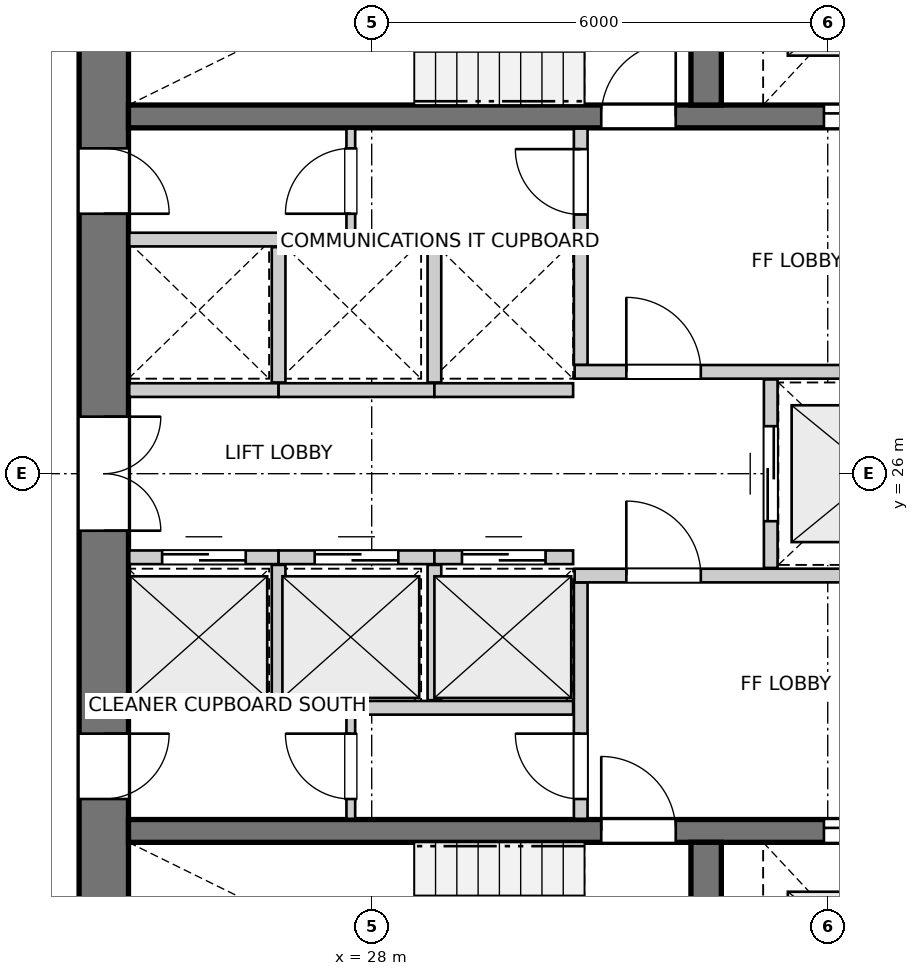
"""IFC4 building model, lengths in metres.
Left out: names, types, materials, properties, quantities, classifications, styles, units other than length and angle.
Written with IfcOpenShell. Run it as: python <this file> out.ifc"""

import sys

from ifc_helpers import new_model, si_unit, direction, frame, frame_2d, origin, place, context, subcontext, project, spatial, rectangle, extrude, source, transform, mapped, element, fill, save


model = new_model("IFC4")
c1 = context("Model", 3, precision=1e-05, world=origin(), true_north=direction((0.0, 1.0)))
c2 = subcontext(c1, "Body", "Model", "MODEL_VIEW")
j1 = project(units=[si_unit("LENGTHUNIT", "METRE"), si_unit("PLANEANGLEUNIT", "RADIAN")], contexts=[c1])
p1 = place(None, origin())
s1 = spatial("IfcSite", under=j1, at=p1, CompositionType="ELEMENT")
p2 = place(p1, origin())
s2 = spatial("IfcBuilding", under=s1, at=p2, CompositionType="ELEMENT")
p3 = place(p2, frame((0.0, 0.0, 80.0)))
s3 = spatial("IfcBuildingStorey", under=s2, at=p3, CompositionType="ELEMENT", Elevation=80.0)
p4 = place(p3, frame((24.475, 33.8, 0.0), z_axis=(0.0, 0.0, 1.0), x_axis=(0.0, -1.0, 0.0)))
e1 = element("IfcWall", 1, at=p4, inside=s3, PredefinedType="SHEAR", context=c2, shape_type="SweptSolid", body=[
    extrude(rectangle(XDim=15.6, YDim=0.65, at=frame_2d((7.8, 0.0))), origin(), (0.0, 0.0, 1.0), 2.935),
])
p5 = place(p4, frame((7.05, 0.0, 0.0)))
e2 = element("IfcOpeningElement", 2, at=p5, cuts=e1, PredefinedType="OPENING", context=c2, shape_type="SweptSolid", body=[
    extrude(rectangle(XDim=1.5, YDim=2.15, at=frame_2d((0.75, 1.075))), frame((0.0, 0.335, 0.0), z_axis=(0.0, -1.0, 0.0), x_axis=(1.0, 0.0, 0.0)), (0.0, 0.0, 1.0), 0.67),
])
p6 = place(p4, frame((3.52, 0.0, 0.0)))
e3 = element("IfcOpeningElement", 3, at=p6, cuts=e1, PredefinedType="OPENING", context=c2, shape_type="SweptSolid", body=[
    extrude(rectangle(XDim=0.86, YDim=2.05, at=frame_2d((0.43, 1.025))), frame((0.0, 0.335, 0.0), z_axis=(0.0, -1.0, 0.0), x_axis=(1.0, 0.0, 0.0)), (0.0, 0.0, 1.0), 0.67),
])
p7 = place(p4, frame((11.22, 0.0, 0.0)))
e4 = element("IfcOpeningElement", 4, at=p7, cuts=e1, PredefinedType="OPENING", context=c2, shape_type="SweptSolid", body=[
    extrude(rectangle(XDim=0.86, YDim=2.05, at=frame_2d((0.43, 1.025))), frame((0.0, 0.335, 0.0), z_axis=(0.0, -1.0, 0.0), x_axis=(1.0, 0.0, 0.0)), (0.0, 0.0, 1.0), 0.67),
])
p8 = place(p3, frame((24.8, 21.3, 0.0), z_axis=(0.0, 0.0, 1.0), x_axis=(1.0, 0.0, 0.0)))
e5 = element("IfcWall", 5, at=p8, inside=s3, PredefinedType="SHEAR", context=c2, shape_type="SweptSolid", body=[
    extrude(rectangle(XDim=11.1, YDim=0.3, at=frame_2d((5.55, 0.0))), origin(), (0.0, 0.0, 1.0), 2.935),
])
p9 = place(p8, frame((6.22, 0.0, 0.0)))
e6 = element("IfcOpeningElement", 6, at=p9, cuts=e5, PredefinedType="OPENING", context=c2, shape_type="SweptSolid", body=[
    extrude(rectangle(XDim=0.98, YDim=2.15, at=frame_2d((0.49, 1.075))), frame((0.0, 0.16, 0.0), z_axis=(0.0, -1.0, 0.0), x_axis=(1.0, 0.0, 0.0)), (0.0, 0.0, 1.0), 0.32),
])
p10 = place(p8, frame((9.15, 0.0, 0.0)))
e7 = element("IfcOpeningElement", 7, at=p10, cuts=e5, PredefinedType="OPENING", context=c2, shape_type="SweptSolid", body=[
    extrude(rectangle(XDim=1.15, YDim=2.15, at=frame_2d((0.575, 1.075))), frame((0.0, 0.16, 0.0), z_axis=(0.0, -1.0, 0.0), x_axis=(1.0, 0.0, 0.0)), (0.0, 0.0, 1.0), 0.32),
])
p11 = place(p3, frame((32.4, 18.2, 0.0), z_axis=(0.0, 0.0, 1.0), x_axis=(0.0, 1.0, 0.0)))
e8 = element("IfcWall", 8, at=p11, inside=s3, PredefinedType="SHEAR", context=c2, shape_type="SweptSolid", body=[
    extrude(rectangle(XDim=2.95, YDim=0.4, at=frame_2d((1.475, 0.0))), origin(), (0.0, 0.0, 1.0), 2.935),
])
p12 = place(p3, frame((24.8, 30.7, 0.0), z_axis=(0.0, 0.0, 1.0), x_axis=(1.0, 0.0, 0.0)))
e9 = element("IfcWall", 9, at=p12, inside=s3, PredefinedType="SHEAR", context=c2, shape_type="SweptSolid", body=[
    extrude(rectangle(XDim=11.1, YDim=0.3, at=frame_2d((5.55, 0.0))), origin(), (0.0, 0.0, 1.0), 2.935),
])
p13 = place(p12, frame((6.22, 0.0, 0.0)))
e10 = element("IfcOpeningElement", 10, at=p13, cuts=e9, PredefinedType="OPENING", context=c2, shape_type="SweptSolid", body=[
    extrude(rectangle(XDim=0.98, YDim=2.15, at=frame_2d((0.49, 1.075))), frame((0.0, 0.16, 0.0), z_axis=(0.0, -1.0, 0.0), x_axis=(1.0, 0.0, 0.0)), (0.0, 0.0, 1.0), 0.32),
])
p14 = place(p12, frame((9.15, 0.0, 0.0)))
e11 = element("IfcOpeningElement", 11, at=p14, cuts=e9, PredefinedType="OPENING", context=c2, shape_type="SweptSolid", body=[
    extrude(rectangle(XDim=1.15, YDim=2.15, at=frame_2d((0.575, 1.075))), frame((0.0, 0.16, 0.0), z_axis=(0.0, -1.0, 0.0), x_axis=(1.0, 0.0, 0.0)), (0.0, 0.0, 1.0), 0.32),
])
p15 = place(p3, frame((32.4, 30.85, 0.0), z_axis=(0.0, 0.0, 1.0), x_axis=(0.0, 1.0, 0.0)))
e12 = element("IfcWall", 12, at=p15, inside=s3, PredefinedType="SHEAR", context=c2, shape_type="SweptSolid", body=[
    extrude(rectangle(XDim=2.95, YDim=0.4, at=frame_2d((1.475, 0.0))), origin(), (0.0, 0.0, 1.0), 2.935),
])
p16 = place(p3, frame((30.75, 21.46, 0.0), z_axis=(0.0, 0.0, 1.0), x_axis=(0.0, 1.0, 0.0)))
e13 = element("IfcWall", 13, at=p16, inside=s3, PredefinedType="PARTITIONING", context=c2, shape_type="SweptSolid", body=[
    extrude(rectangle(XDim=3.11, YDim=0.18, at=frame_2d((1.555, 0.0))), origin(), (0.0, 0.0, 1.0), 2.935),
])
p17 = place(p16, frame((0.26, 0.0, 0.0)))
e14 = element("IfcOpeningElement", 14, at=p17, cuts=e13, PredefinedType="OPENING", context=c2, shape_type="SweptSolid", body=[
    extrude(rectangle(XDim=0.86, YDim=2.05, at=frame_2d((0.43, 1.025))), frame((0.0, 0.1, 0.0), z_axis=(0.0, -1.0, 0.0), x_axis=(1.0, 0.0, 0.0)), (0.0, 0.0, 1.0), 0.2),
])
p18 = place(p3, frame((30.67, 24.66, 0.0), z_axis=(0.0, 0.0, 1.0), x_axis=(1.0, 0.0, 0.0)))
e15 = element("IfcWall", 15, at=p18, inside=s3, PredefinedType="PARTITIONING", context=c2, shape_type="SweptSolid", body=[
    extrude(rectangle(XDim=5.22, YDim=0.18, at=frame_2d((2.61, 0.0))), origin(), (0.0, 0.0, 1.0), 2.935),
])
p19 = place(p18, frame((0.68, 0.0, 0.0)))
e16 = element("IfcOpeningElement", 16, at=p19, cuts=e15, PredefinedType="OPENING", context=c2, shape_type="SweptSolid", body=[
    extrude(rectangle(XDim=0.98, YDim=2.15, at=frame_2d((0.49, 1.075))), frame((0.0, 0.1, 0.0), z_axis=(0.0, -1.0, 0.0), x_axis=(1.0, 0.0, 0.0)), (0.0, 0.0, 1.0), 0.2),
])
p20 = place(p3, frame((30.75, 27.43, 0.0), z_axis=(0.0, 0.0, 1.0), x_axis=(0.0, 1.0, 0.0)))
e17 = element("IfcWall", 17, at=p20, inside=s3, PredefinedType="PARTITIONING", context=c2, shape_type="SweptSolid", body=[
    extrude(rectangle(XDim=3.11, YDim=0.18, at=frame_2d((1.555, 0.0))), origin(), (0.0, 0.0, 1.0), 2.935),
])
p21 = place(p20, frame((1.98, 0.0, 0.0)))
e18 = element("IfcOpeningElement", 18, at=p21, cuts=e17, PredefinedType="OPENING", context=c2, shape_type="SweptSolid", body=[
    extrude(rectangle(XDim=0.86, YDim=2.05, at=frame_2d((0.43, 1.025))), frame((0.0, 0.1, 0.0), z_axis=(0.0, -1.0, 0.0), x_axis=(1.0, 0.0, 0.0)), (0.0, 0.0, 1.0), 0.2),
])
p22 = place(p3, frame((30.67, 27.34, 0.0), z_axis=(0.0, 0.0, 1.0), x_axis=(1.0, 0.0, 0.0)))
e19 = element("IfcWall", 19, at=p22, inside=s3, PredefinedType="PARTITIONING", context=c2, shape_type="SweptSolid", body=[
    extrude(rectangle(XDim=5.22, YDim=0.18, at=frame_2d((2.61, 0.0))), origin(), (0.0, 0.0, 1.0), 2.935),
])
p23 = place(p22, frame((0.68, 0.0, 0.0)))
e20 = element("IfcOpeningElement", 20, at=p23, cuts=e19, PredefinedType="OPENING", context=c2, shape_type="SweptSolid", body=[
    extrude(rectangle(XDim=0.98, YDim=2.15, at=frame_2d((0.49, 1.075))), frame((0.0, 0.1, 0.0), z_axis=(0.0, -1.0, 0.0), x_axis=(1.0, 0.0, 0.0)), (0.0, 0.0, 1.0), 0.2),
])
p24 = place(p3, frame((33.25, 24.76, 0.0), z_axis=(0.0, 0.0, 1.0), x_axis=(0.0, 1.0, 0.0)))
e21 = element("IfcWall", 21, at=p24, inside=s3, PredefinedType="PARTITIONING", context=c2, shape_type="SweptSolid", body=[
    extrude(rectangle(XDim=2.48, YDim=0.18, at=frame_2d((1.24, 0.0))), origin(), (0.0, 0.0, 1.0), 2.935),
])
p25 = place(p24, frame((0.615, 0.0, 0.0)))
e22 = element("IfcOpeningElement", 22, at=p25, cuts=e21, PredefinedType="OPENING", context=c2, shape_type="SweptSolid", body=[
    extrude(rectangle(XDim=1.25, YDim=2.15, at=frame_2d((0.625, 1.075))), frame((0.0, 0.1, 0.0), z_axis=(0.0, -1.0, 0.0), x_axis=(1.0, 0.0, 0.0)), (0.0, 0.0, 1.0), 0.2),
])
p26 = place(p3, frame((24.81, 22.92, 0.0), z_axis=(0.0, 0.0, 1.0), x_axis=(1.0, 0.0, 0.0)))
e23 = element("IfcWall", 23, at=p26, inside=s3, PredefinedType="PARTITIONING", context=c2, shape_type="SweptSolid", body=[
    extrude(rectangle(XDim=5.84, YDim=0.18, at=frame_2d((2.92, 0.0))), origin(), (0.0, 0.0, 1.0), 2.935),
])
p27 = place(p3, frame((24.81, 24.9, 0.0), z_axis=(0.0, 0.0, 1.0), x_axis=(1.0, 0.0, 0.0)))
e24 = element("IfcWall", 24, at=p27, inside=s3, PredefinedType="PARTITIONING", context=c2, shape_type="SweptSolid", body=[
    extrude(rectangle(XDim=1.965, YDim=0.18, at=frame_2d((0.982, 0.0))), origin(), (0.0, 0.0, 1.0), 2.935),
])
p28 = place(p27, frame((0.433, 0.0, 0.0)))
e25 = element("IfcOpeningElement", 25, at=p28, cuts=e24, PredefinedType="OPENING", context=c2, shape_type="SweptSolid", body=[
    extrude(rectangle(XDim=1.1, YDim=2.15, at=frame_2d((0.55, 1.075))), frame((0.0, 0.1, 0.0), z_axis=(0.0, -1.0, 0.0), x_axis=(1.0, 0.0, 0.0)), (0.0, 0.0, 1.0), 0.2),
])
p29 = place(p3, frame((26.775, 24.9, 0.0), z_axis=(0.0, 0.0, 1.0), x_axis=(1.0, 0.0, 0.0)))
e26 = element("IfcWall", 26, at=p29, inside=s3, PredefinedType="PARTITIONING", context=c2, shape_type="SweptSolid", body=[
    extrude(rectangle(XDim=2.05, YDim=0.18, at=frame_2d((1.025, 0.0))), origin(), (0.0, 0.0, 1.0), 2.935),
])
p30 = place(p29, frame((0.475, 0.0, 0.0)))
e27 = element("IfcOpeningElement", 27, at=p30, cuts=e26, PredefinedType="OPENING", context=c2, shape_type="SweptSolid", body=[
    extrude(rectangle(XDim=1.1, YDim=2.15, at=frame_2d((0.55, 1.075))), frame((0.0, 0.1, 0.0), z_axis=(0.0, -1.0, 0.0), x_axis=(1.0, 0.0, 0.0)), (0.0, 0.0, 1.0), 0.2),
])
p31 = place(p3, frame((26.775, 23.02, 0.0), z_axis=(0.0, 0.0, 1.0), x_axis=(0.0, 1.0, 0.0)))
e28 = element("IfcWall", 28, at=p31, inside=s3, PredefinedType="PARTITIONING", context=c2, shape_type="SweptSolid", body=[
    extrude(rectangle(XDim=1.78, YDim=0.18, at=frame_2d((0.89, 0.0))), origin(), (0.0, 0.0, 1.0), 2.935),
])
p32 = place(p3, frame((28.825, 24.9, 0.0), z_axis=(0.0, 0.0, 1.0), x_axis=(1.0, 0.0, 0.0)))
e29 = element("IfcWall", 29, at=p32, inside=s3, PredefinedType="PARTITIONING", context=c2, shape_type="SweptSolid", body=[
    extrude(rectangle(XDim=1.825, YDim=0.18, at=frame_2d((0.913, 0.0))), origin(), (0.0, 0.0, 1.0), 2.935),
])
p33 = place(p32, frame((0.363, 0.0, 0.0)))
e30 = element("IfcOpeningElement", 30, at=p33, cuts=e29, PredefinedType="OPENING", context=c2, shape_type="SweptSolid", body=[
    extrude(rectangle(XDim=1.1, YDim=2.15, at=frame_2d((0.55, 1.075))), frame((0.0, 0.1, 0.0), z_axis=(0.0, -1.0, 0.0), x_axis=(1.0, 0.0, 0.0)), (0.0, 0.0, 1.0), 0.2),
])
p34 = place(p3, frame((28.825, 23.02, 0.0), z_axis=(0.0, 0.0, 1.0), x_axis=(0.0, 1.0, 0.0)))
e31 = element("IfcWall", 31, at=p34, inside=s3, PredefinedType="PARTITIONING", context=c2, shape_type="SweptSolid", body=[
    extrude(rectangle(XDim=1.78, YDim=0.18, at=frame_2d((0.89, 0.0))), origin(), (0.0, 0.0, 1.0), 2.935),
])
p35 = place(p3, frame((24.81, 29.08, 0.0), z_axis=(0.0, 0.0, 1.0), x_axis=(1.0, 0.0, 0.0)))
e32 = element("IfcWall", 32, at=p35, inside=s3, PredefinedType="PARTITIONING", context=c2, shape_type="SweptSolid", body=[
    extrude(rectangle(XDim=5.84, YDim=0.18, at=frame_2d((2.92, 0.0))), origin(), (0.0, 0.0, 1.0), 2.935),
])
p36 = place(p3, frame((24.81, 27.1, 0.0), z_axis=(0.0, 0.0, 1.0), x_axis=(1.0, 0.0, 0.0)))
e33 = element("IfcWall", 33, at=p36, inside=s3, PredefinedType="PARTITIONING", context=c2, shape_type="SweptSolid", body=[
    extrude(rectangle(XDim=1.965, YDim=0.18, at=frame_2d((0.982, 0.0))), origin(), (0.0, 0.0, 1.0), 2.935),
])
p37 = place(p3, frame((26.775, 27.1, 0.0), z_axis=(0.0, 0.0, 1.0), x_axis=(1.0, 0.0, 0.0)))
e34 = element("IfcWall", 34, at=p37, inside=s3, PredefinedType="PARTITIONING", context=c2, shape_type="SweptSolid", body=[
    extrude(rectangle(XDim=2.05, YDim=0.18, at=frame_2d((1.025, 0.0))), origin(), (0.0, 0.0, 1.0), 2.935),
])
p38 = place(p3, frame((26.775, 27.2, 0.0), z_axis=(0.0, 0.0, 1.0), x_axis=(0.0, 1.0, 0.0)))
e35 = element("IfcWall", 35, at=p38, inside=s3, PredefinedType="PARTITIONING", context=c2, shape_type="SweptSolid", body=[
    extrude(rectangle(XDim=1.78, YDim=0.18, at=frame_2d((0.89, 0.0))), origin(), (0.0, 0.0, 1.0), 2.935),
])
p39 = place(p3, frame((28.825, 27.1, 0.0), z_axis=(0.0, 0.0, 1.0), x_axis=(1.0, 0.0, 0.0)))
e36 = element("IfcWall", 36, at=p39, inside=s3, PredefinedType="PARTITIONING", context=c2, shape_type="SweptSolid", body=[
    extrude(rectangle(XDim=1.825, YDim=0.18, at=frame_2d((0.913, 0.0))), origin(), (0.0, 0.0, 1.0), 2.935),
])
p40 = place(p3, frame((28.825, 27.2, 0.0), z_axis=(0.0, 0.0, 1.0), x_axis=(0.0, 1.0, 0.0)))
e37 = element("IfcWall", 37, at=p40, inside=s3, PredefinedType="PARTITIONING", context=c2, shape_type="SweptSolid", body=[
    extrude(rectangle(XDim=1.78, YDim=0.18, at=frame_2d((0.89, 0.0))), origin(), (0.0, 0.0, 1.0), 2.935),
])
p41 = place(p3, frame((27.725, 21.46, 0.0), z_axis=(0.0, 0.0, 1.0), x_axis=(0.0, 1.0, 0.0)))
e38 = element("IfcWall", 38, at=p41, inside=s3, PredefinedType="PARTITIONING", context=c2, shape_type="SweptSolid", body=[
    extrude(rectangle(XDim=1.38, YDim=0.115, at=frame_2d((0.69, 0.0))), origin(), (0.0, 0.0, 1.0), 2.935),
])
p42 = place(p41, frame((0.26, 0.0, 0.0)))
e39 = element("IfcOpeningElement", 39, at=p42, cuts=e38, PredefinedType="OPENING", context=c2, shape_type="SweptSolid", body=[
    extrude(rectangle(XDim=0.86, YDim=2.05, at=frame_2d((0.43, 1.025))), frame((0.0, 0.067, 0.0), z_axis=(0.0, -1.0, 0.0), x_axis=(1.0, 0.0, 0.0)), (0.0, 0.0, 1.0), 0.135),
])
p43 = place(p3, frame((27.725, 29.16, 0.0), z_axis=(0.0, 0.0, 1.0), x_axis=(0.0, 1.0, 0.0)))
e40 = element("IfcWall", 40, at=p43, inside=s3, PredefinedType="PARTITIONING", context=c2, shape_type="SweptSolid", body=[
    extrude(rectangle(XDim=1.38, YDim=0.115, at=frame_2d((0.69, 0.0))), origin(), (0.0, 0.0, 1.0), 2.935),
])
p44 = place(p43, frame((0.26, 0.0, 0.0)))
e41 = element("IfcOpeningElement", 41, at=p44, cuts=e40, PredefinedType="OPENING", context=c2, shape_type="SweptSolid", body=[
    extrude(rectangle(XDim=0.86, YDim=2.05, at=frame_2d((0.43, 1.025))), frame((0.0, 0.067, 0.0), z_axis=(0.0, -1.0, 0.0), x_axis=(1.0, 0.0, 0.0)), (0.0, 0.0, 1.0), 0.135),
])
m1 = source(origin(), c2, "Body", "SweptSolid", [
    extrude(rectangle(XDim=0.98, YDim=2.15, at=frame_2d((0.49, 1.075))), frame((0.0, 0.025, 0.0), z_axis=(0.0, -1.0, 0.0), x_axis=(1.0, 0.0, 0.0)), (0.0, 0.0, 1.0), 0.05),
])
p45 = place(p9, origin())
e42 = element("IfcDoor", 42, at=p45, inside=s3, OperationType="SINGLE_SWING_LEFT", PredefinedType="DOOR", context=c2, shape_type="MappedRepresentation", body=[
    mapped(m1, transform((0.0, 0.0, 0.0), x_axis=(1.0, 0.0, 0.0), y_axis=(0.0, 1.0, 0.0), z_axis=(0.0, 0.0, 1.0), scale=1.0)),
])
fill(e6, e42)
m2 = source(origin(), c2, "Body", "SweptSolid", [
    extrude(rectangle(XDim=1.15, YDim=2.15, at=frame_2d((0.575, 1.075))), frame((0.0, 0.025, 0.0), z_axis=(0.0, -1.0, 0.0), x_axis=(1.0, 0.0, 0.0)), (0.0, 0.0, 1.0), 0.05),
])
p46 = place(p10, origin())
e43 = element("IfcDoor", 43, at=p46, inside=s3, OperationType="DOUBLE_DOOR_SLIDING", PredefinedType="DOOR", context=c2, shape_type="MappedRepresentation", body=[
    mapped(m2, transform((0.0, 0.0, 0.0), x_axis=(1.0, 0.0, 0.0), y_axis=(0.0, 1.0, 0.0), z_axis=(0.0, 0.0, 1.0), scale=1.0)),
])
fill(e7, e43)
p47 = place(p13, origin())
e44 = element("IfcDoor", 44, at=p47, inside=s3, OperationType="SINGLE_SWING_RIGHT", PredefinedType="DOOR", context=c2, shape_type="MappedRepresentation", body=[
    mapped(m1, transform((0.0, 0.0, 0.0), x_axis=(1.0, 0.0, 0.0), y_axis=(0.0, 1.0, 0.0), z_axis=(0.0, 0.0, 1.0), scale=1.0)),
])
fill(e10, e44)
p48 = place(p14, origin())
e45 = element("IfcDoor", 45, at=p48, inside=s3, OperationType="DOUBLE_DOOR_SLIDING", PredefinedType="DOOR", context=c2, shape_type="MappedRepresentation", body=[
    mapped(m2, transform((0.0, 0.0, 0.0), x_axis=(1.0, 0.0, 0.0), y_axis=(0.0, 1.0, 0.0), z_axis=(0.0, 0.0, 1.0), scale=1.0)),
])
fill(e11, e45)
m3 = source(origin(), c2, "Body", "SweptSolid", [
    extrude(rectangle(XDim=1.5, YDim=2.15, at=frame_2d((0.75, 1.075))), frame((0.0, 0.025, 0.0), z_axis=(0.0, -1.0, 0.0), x_axis=(1.0, 0.0, 0.0)), (0.0, 0.0, 1.0), 0.05),
])
p49 = place(p5, origin())
e46 = element("IfcDoor", 46, at=p49, inside=s3, OperationType="DOUBLE_DOOR_SINGLE_SWING", PredefinedType="DOOR", context=c2, shape_type="MappedRepresentation", body=[
    mapped(m3, transform((0.0, 0.0, 0.0), x_axis=(1.0, 0.0, 0.0), y_axis=(0.0, 1.0, 0.0), z_axis=(0.0, 0.0, 1.0), scale=1.0)),
])
fill(e2, e46)
m4 = source(origin(), c2, "Body", "SweptSolid", [
    extrude(rectangle(XDim=0.86, YDim=2.05, at=frame_2d((0.43, 1.025))), frame((0.0, 0.025, 0.0), z_axis=(0.0, -1.0, 0.0), x_axis=(1.0, 0.0, 0.0)), (0.0, 0.0, 1.0), 0.05),
])
p50 = place(p6, origin())
e47 = element("IfcDoor", 47, at=p50, inside=s3, OperationType="SINGLE_SWING_RIGHT", PredefinedType="DOOR", context=c2, shape_type="MappedRepresentation", body=[
    mapped(m4, transform((0.0, 0.0, 0.0), x_axis=(1.0, 0.0, 0.0), y_axis=(0.0, 1.0, 0.0), z_axis=(0.0, 0.0, 1.0), scale=1.0)),
])
fill(e3, e47)
p51 = place(p7, origin())
e48 = element("IfcDoor", 48, at=p51, inside=s3, OperationType="SINGLE_SWING_LEFT", PredefinedType="DOOR", context=c2, shape_type="MappedRepresentation", body=[
    mapped(m4, transform((0.0, 0.0, 0.0), x_axis=(1.0, 0.0, 0.0), y_axis=(0.0, 1.0, 0.0), z_axis=(0.0, 0.0, 1.0), scale=1.0)),
])
fill(e4, e48)
p52 = place(p17, origin())
e49 = element("IfcDoor", 49, at=p52, inside=s3, OperationType="SINGLE_SWING_RIGHT", PredefinedType="DOOR", context=c2, shape_type="MappedRepresentation", body=[
    mapped(m4, transform((0.0, 0.0, 0.0), x_axis=(1.0, 0.0, 0.0), y_axis=(0.0, 1.0, 0.0), z_axis=(0.0, 0.0, 1.0), scale=1.0)),
])
fill(e14, e49)
p53 = place(p19, origin())
e50 = element("IfcDoor", 50, at=p53, inside=s3, OperationType="SINGLE_SWING_LEFT", PredefinedType="DOOR", context=c2, shape_type="MappedRepresentation", body=[
    mapped(m1, transform((0.0, 0.0, 0.0), x_axis=(1.0, 0.0, 0.0), y_axis=(0.0, 1.0, 0.0), z_axis=(0.0, 0.0, 1.0), scale=1.0)),
])
fill(e16, e50)
p54 = place(p21, origin())
e51 = element("IfcDoor", 51, at=p54, inside=s3, OperationType="SINGLE_SWING_RIGHT", PredefinedType="DOOR", context=c2, shape_type="MappedRepresentation", body=[
    mapped(m4, transform((0.0, 0.0, 0.0), x_axis=(1.0, 0.0, 0.0), y_axis=(0.0, 1.0, 0.0), z_axis=(0.0, 0.0, 1.0), scale=1.0)),
])
fill(e18, e51)
p55 = place(p23, origin())
e52 = element("IfcDoor", 52, at=p55, inside=s3, OperationType="SINGLE_SWING_LEFT", PredefinedType="DOOR", context=c2, shape_type="MappedRepresentation", body=[
    mapped(m1, transform((0.0, 0.0, 0.0), x_axis=(1.0, 0.0, 0.0), y_axis=(0.0, 1.0, 0.0), z_axis=(0.0, 0.0, 1.0), scale=1.0)),
])
fill(e20, e52)
m5 = source(origin(), c2, "Body", "SweptSolid", [
    extrude(rectangle(XDim=1.25, YDim=2.15, at=frame_2d((0.625, 1.075))), frame((0.0, 0.025, 0.0), z_axis=(0.0, -1.0, 0.0), x_axis=(1.0, 0.0, 0.0)), (0.0, 0.0, 1.0), 0.05),
])
p56 = place(p25, origin())
e53 = element("IfcDoor", 53, at=p56, inside=s3, OperationType="DOUBLE_DOOR_SLIDING", PredefinedType="DOOR", context=c2, shape_type="MappedRepresentation", body=[
    mapped(m5, transform((0.0, 0.0, 0.0), x_axis=(1.0, 0.0, 0.0), y_axis=(0.0, 1.0, 0.0), z_axis=(0.0, 0.0, 1.0), scale=1.0)),
])
fill(e22, e53)
m6 = source(origin(), c2, "Body", "SweptSolid", [
    extrude(rectangle(XDim=1.1, YDim=2.15, at=frame_2d((0.55, 1.075))), frame((0.0, 0.025, 0.0), z_axis=(0.0, -1.0, 0.0), x_axis=(1.0, 0.0, 0.0)), (0.0, 0.0, 1.0), 0.05),
])
p57 = place(p28, origin())
e54 = element("IfcDoor", 54, at=p57, inside=s3, OperationType="DOUBLE_DOOR_SLIDING", PredefinedType="DOOR", context=c2, shape_type="MappedRepresentation", body=[
    mapped(m6, transform((0.0, 0.0, 0.0), x_axis=(1.0, 0.0, 0.0), y_axis=(0.0, 1.0, 0.0), z_axis=(0.0, 0.0, 1.0), scale=1.0)),
])
fill(e25, e54)
p58 = place(p30, origin())
e55 = element("IfcDoor", 55, at=p58, inside=s3, OperationType="DOUBLE_DOOR_SLIDING", PredefinedType="DOOR", context=c2, shape_type="MappedRepresentation", body=[
    mapped(m6, transform((0.0, 0.0, 0.0), x_axis=(1.0, 0.0, 0.0), y_axis=(0.0, 1.0, 0.0), z_axis=(0.0, 0.0, 1.0), scale=1.0)),
])
fill(e27, e55)
p59 = place(p33, origin())
e56 = element("IfcDoor", 56, at=p59, inside=s3, OperationType="DOUBLE_DOOR_SLIDING", PredefinedType="DOOR", context=c2, shape_type="MappedRepresentation", body=[
    mapped(m6, transform((0.0, 0.0, 0.0), x_axis=(1.0, 0.0, 0.0), y_axis=(0.0, 1.0, 0.0), z_axis=(0.0, 0.0, 1.0), scale=1.0)),
])
fill(e30, e56)
p60 = place(p42, origin())
e57 = element("IfcDoor", 57, at=p60, inside=s3, OperationType="SINGLE_SWING_RIGHT", PredefinedType="DOOR", context=c2, shape_type="MappedRepresentation", body=[
    mapped(m4, transform((0.0, 0.0, 0.0), x_axis=(1.0, 0.0, 0.0), y_axis=(0.0, 1.0, 0.0), z_axis=(0.0, 0.0, 1.0), scale=1.0)),
])
fill(e39, e57)
p61 = place(p44, origin())
e58 = element("IfcDoor", 58, at=p61, inside=s3, OperationType="SINGLE_SWING_LEFT", PredefinedType="DOOR", context=c2, shape_type="MappedRepresentation", body=[
    mapped(m4, transform((0.0, 0.0, 0.0), x_axis=(1.0, 0.0, 0.0), y_axis=(0.0, 1.0, 0.0), z_axis=(0.0, 0.0, 1.0), scale=1.0)),
])
fill(e41, e58)
save(model, sys.argv[1])
